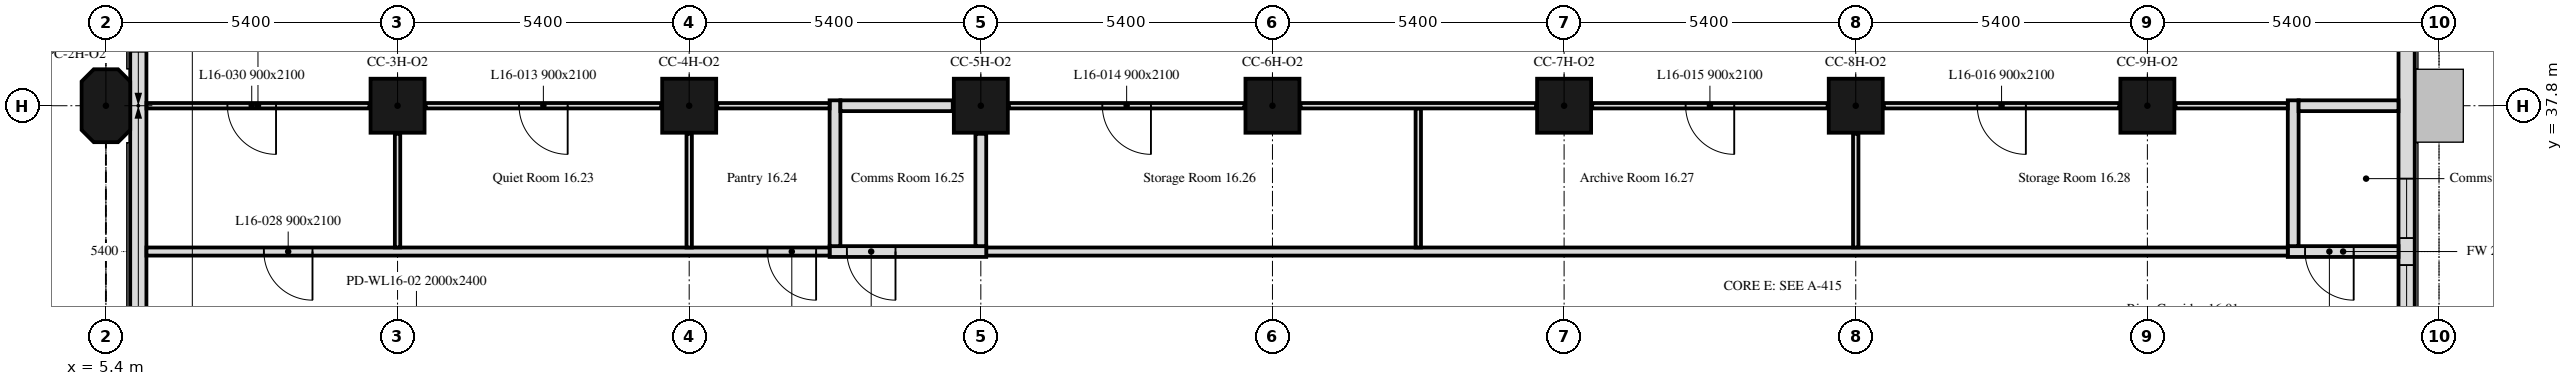
"""IFC4 building model, lengths in metres.
Left out: names, types, materials, properties, quantities, classifications, styles, units other than length and angle.
Written with IfcOpenShell. Run it as: python <this file> out.ifc"""

import sys

from ifc_helpers import new_model, si_unit, direction, frame, frame_2d, origin, origin_2d, place, context, subcontext, project, spatial, polyline, rectangle, outline, extrude, element, fill, save


model = new_model("IFC4")
c1 = context("Model", 3, precision=1e-05, world=origin(), true_north=direction((0.0, 1.0)))
c2 = subcontext(c1, "Body", "Model", "MODEL_VIEW")
j1 = project(units=[si_unit("LENGTHUNIT", "METRE"), si_unit("PLANEANGLEUNIT", "RADIAN")], contexts=[c1])
p1 = place(None, origin())
s1 = spatial("IfcSite", under=j1, at=p1, CompositionType="ELEMENT")
p2 = place(p1, origin())
s2 = spatial("IfcBuilding", under=s1, at=p2, CompositionType="ELEMENT")
p3 = place(p2, frame((0.0, 0.0, 72.6)))
s3 = spatial("IfcBuildingStorey", under=s2, at=p3, CompositionType="ELEMENT", Elevation=72.6)
p4 = place(p3, frame((5.4, 37.8, 0.0), z_axis=(0.0, 0.0, 1.0), x_axis=(0.0, 1.0, 0.0)))
e1 = element("IfcColumn", 1, at=p4, inside=s3, PredefinedType="COLUMN", context=c2, shape_type="SweptSolid", body=[
    extrude(outline(polyline([(-0.45, -0.45), (0.45, -0.45), (0.675, -0.225), (0.675, 0.225), (0.45, 0.45), (-0.45, 0.45), (-0.675, 0.225), (-0.675, -0.225), (-0.45, -0.45)])), origin(), (0.0, 0.0, 1.0), 3.5),
])
for number, where, z_axis, x_axis in (
    (2, (10.8, 37.8, 0.0), (0.0, 0.0, 1.0), (1.0, 0.0, 0.0)),
    (3, (16.2, 37.8, 0.0), (0.0, 0.0, 1.0), (1.0, 0.0, 0.0)),
    (4, (21.6, 37.8, 0.0), (0.0, 0.0, 1.0), (1.0, 0.0, 0.0)),
    (5, (27.0, 37.8, 0.0), (0.0, 0.0, 1.0), (1.0, 0.0, 0.0)),
    (6, (32.4, 37.8, 0.0), (0.0, 0.0, 1.0), (1.0, 0.0, 0.0)),
    (7, (37.8, 37.8, 0.0), (0.0, 0.0, 1.0), (1.0, 0.0, 0.0)),
    (8, (43.2, 37.8, 0.0), (0.0, 0.0, 1.0), (1.0, 0.0, 0.0)),
):
    element("IfcColumn", number, at=place(p3, frame(where, z_axis=z_axis, x_axis=x_axis)), inside=s3, PredefinedType="COLUMN", context=c2, shape_type="SweptSolid", body=[
        extrude(rectangle(XDim=1.0, YDim=1.0, at=origin_2d()), origin(), (0.0, 0.0, 1.0), 3.5),
    ])
p5 = place(p3, frame((48.0, 10.986, 0.0), z_axis=(0.0, 0.0, 1.0), x_axis=(0.0, 1.0, 0.0)))
e9 = element("IfcWall", 9, at=p5, inside=s3, PredefinedType="SOLIDWALL", context=c2, shape_type="SweptSolid", body=[
    extrude(rectangle(XDim=32.027, YDim=0.3, at=frame_2d((16.014, 0.0))), origin(), (0.0, 0.0, 1.0), 3.5),
])
p6 = place(p5, frame((1.164, 0.0, 0.9)))
e10 = element("IfcOpeningElement", 10, at=p6, cuts=e9, PredefinedType="OPENING", context=c2, shape_type="SweptSolid", body=[
    extrude(rectangle(XDim=1.1, YDim=1.7, at=frame_2d((0.55, 0.85))), frame((0.0, 0.16, 0.0), z_axis=(0.0, -1.0, 0.0), x_axis=(1.0, 0.0, 0.0)), (0.0, 0.0, 1.0), 0.32),
])
p7 = place(p5, frame((2.764, 0.0, 0.9)))
e11 = element("IfcOpeningElement", 11, at=p7, cuts=e9, PredefinedType="OPENING", context=c2, shape_type="SweptSolid", body=[
    extrude(rectangle(XDim=1.1, YDim=1.7, at=frame_2d((0.55, 0.85))), frame((0.0, 0.16, 0.0), z_axis=(0.0, -1.0, 0.0), x_axis=(1.0, 0.0, 0.0)), (0.0, 0.0, 1.0), 0.32),
])
p8 = place(p5, frame((11.614, 0.0, 0.9)))
e12 = element("IfcOpeningElement", 12, at=p8, cuts=e9, PredefinedType="OPENING", context=c2, shape_type="SweptSolid", body=[
    extrude(rectangle(XDim=3.4, YDim=1.7, at=frame_2d((1.7, 0.85))), frame((0.0, 0.16, 0.0), z_axis=(0.0, -1.0, 0.0), x_axis=(1.0, 0.0, 0.0)), (0.0, 0.0, 1.0), 0.32),
])
p9 = place(p5, frame((22.764, 0.0, 0.9)))
e13 = element("IfcOpeningElement", 13, at=p9, cuts=e9, PredefinedType="OPENING", context=c2, shape_type="SweptSolid", body=[
    extrude(rectangle(XDim=1.1, YDim=1.7, at=frame_2d((0.55, 0.85))), frame((0.0, 0.16, 0.0), z_axis=(0.0, -1.0, 0.0), x_axis=(1.0, 0.0, 0.0)), (0.0, 0.0, 1.0), 0.32),
])
p10 = place(p5, frame((24.364, 0.0, 0.9)))
e14 = element("IfcOpeningElement", 14, at=p10, cuts=e9, PredefinedType="OPENING", context=c2, shape_type="SweptSolid", body=[
    extrude(rectangle(XDim=1.1, YDim=1.7, at=frame_2d((0.55, 0.85))), frame((0.0, 0.16, 0.0), z_axis=(0.0, -1.0, 0.0), x_axis=(1.0, 0.0, 0.0)), (0.0, 0.0, 1.0), 0.32),
])
p11 = place(p3, frame((6.0, 43.014, 0.0), z_axis=(0.0, 0.0, 1.0), x_axis=(0.0, -1.0, 0.0)))
e15 = element("IfcWall", 15, at=p11, inside=s3, PredefinedType="SOLIDWALL", context=c2, shape_type="SweptSolid", body=[
    extrude(rectangle(XDim=10.614, YDim=0.3, at=frame_2d((5.307, 0.0))), origin(), (0.0, 0.0, 1.0), 3.5),
])
p12 = place(p11, frame((0.814, 0.0, 0.9)))
e16 = element("IfcOpeningElement", 16, at=p12, cuts=e15, PredefinedType="OPENING", context=c2, shape_type="SweptSolid", body=[
    extrude(rectangle(XDim=3.4, YDim=1.7, at=frame_2d((1.7, 0.85))), frame((0.0, 0.16, 0.0), z_axis=(0.0, -1.0, 0.0), x_axis=(1.0, 0.0, 0.0)), (0.0, 0.0, 1.0), 0.32),
])
p13 = place(p3, frame((47.849, 35.1, 0.0), z_axis=(0.0, 0.0, 1.0), x_axis=(-1.0, 0.0, 0.0)))
e17 = element("IfcWall", 17, at=p13, inside=s3, PredefinedType="PARTITIONING", context=c2, shape_type="SweptSolid", body=[
    extrude(rectangle(XDim=2.049, YDim=0.2, at=frame_2d((1.024, 0.0))), origin(), (0.0, 0.0, 1.0), 3.5),
])
p14 = place(p13, frame((0.829, 0.0, 0.0)))
e18 = element("IfcOpeningElement", 18, at=p14, cuts=e17, PredefinedType="OPENING", context=c2, shape_type="SweptSolid", body=[
    extrude(rectangle(XDim=0.9, YDim=2.1, at=frame_2d((0.45, 1.05))), frame((0.0, 0.1, 0.0), z_axis=(0.0, -1.0, 0.0), x_axis=(1.0, 0.0, 0.0)), (0.0, 0.0, 1.0), 0.2),
])
p15 = place(p3, frame((45.8, 35.1, 0.0), z_axis=(0.0, 0.0, 1.0), x_axis=(-1.0, 0.0, 0.0)))
e19 = element("IfcWall", 19, at=p15, inside=s3, PredefinedType="PARTITIONING", context=c2, shape_type="SweptSolid", body=[
    extrude(rectangle(XDim=24.1, YDim=0.15, at=frame_2d((12.05, 0.0))), origin(), (0.0, 0.0, 1.0), 2.75),
])
p16 = place(p3, frame((21.7, 35.1, 0.0), z_axis=(0.0, 0.0, 1.0), x_axis=(-1.0, 0.0, 0.0)))
e20 = element("IfcWall", 20, at=p16, inside=s3, PredefinedType="PARTITIONING", context=c2, shape_type="SweptSolid", body=[
    extrude(rectangle(XDim=2.9, YDim=0.2, at=frame_2d((1.45, 0.0))), origin(), (0.0, 0.0, 1.0), 2.75),
])
p17 = place(p16, frame((1.68, 0.0, 0.0)))
e21 = element("IfcOpeningElement", 21, at=p17, cuts=e20, PredefinedType="OPENING", context=c2, shape_type="SweptSolid", body=[
    extrude(rectangle(XDim=0.9, YDim=2.1, at=frame_2d((0.45, 1.05))), frame((0.0, 0.1, 0.0), z_axis=(0.0, -1.0, 0.0), x_axis=(1.0, 0.0, 0.0)), (0.0, 0.0, 1.0), 0.2),
])
p18 = place(p3, frame((18.8, 35.1, 0.0), z_axis=(0.0, 0.0, 1.0), x_axis=(-1.0, 0.0, 0.0)))
e22 = element("IfcWall", 22, at=p18, inside=s3, PredefinedType="PARTITIONING", context=c2, shape_type="SweptSolid", body=[
    extrude(rectangle(XDim=12.649, YDim=0.15, at=frame_2d((6.325, 0.0))), origin(), (0.0, 0.0, 1.0), 2.75),
])
p19 = place(p18, frame((0.25, 0.0, 0.0)))
e23 = element("IfcOpeningElement", 23, at=p19, cuts=e22, PredefinedType="OPENING", context=c2, shape_type="SweptSolid", body=[
    extrude(rectangle(XDim=0.9, YDim=2.1, at=frame_2d((0.45, 1.05))), frame((0.0, 0.075, 0.0), z_axis=(0.0, -1.0, 0.0), x_axis=(1.0, 0.0, 0.0)), (0.0, 0.0, 1.0), 0.15),
])
p20 = place(p18, frame((9.575, 0.0, 0.0)))
e24 = element("IfcOpeningElement", 24, at=p20, cuts=e22, PredefinedType="OPENING", context=c2, shape_type="SweptSolid", body=[
    extrude(rectangle(XDim=0.9, YDim=2.1, at=frame_2d((0.45, 1.05))), frame((0.0, 0.075, 0.0), z_axis=(0.0, -1.0, 0.0), x_axis=(1.0, 0.0, 0.0)), (0.0, 0.0, 1.0), 0.15),
])
p21 = place(p3, frame((10.28, 37.8, 0.0), z_axis=(0.0, 0.0, 1.0), x_axis=(-1.0, 0.0, 0.0)))
e25 = element("IfcWall", 25, at=p21, inside=s3, PredefinedType="PARTITIONING", context=c2, shape_type="SweptSolid", body=[
    extrude(rectangle(XDim=4.129, YDim=0.1, at=frame_2d((2.064, 0.0))), origin(), (0.0, 0.0, 1.0), 3.5),
])
p22 = place(p21, frame((1.73, 0.0, 0.0)))
e26 = element("IfcOpeningElement", 26, at=p22, cuts=e25, PredefinedType="OPENING", context=c2, shape_type="SweptSolid", body=[
    extrude(rectangle(XDim=0.9, YDim=2.1, at=frame_2d((0.45, 1.05))), frame((0.0, 0.05, 0.0), z_axis=(0.0, -1.0, 0.0), x_axis=(1.0, 0.0, 0.0)), (0.0, 0.0, 1.0), 0.1),
])
p23 = place(p3, frame((10.8, 35.175, 0.0), z_axis=(0.0, 0.0, 1.0), x_axis=(0.0, 1.0, 0.0)))
e27 = element("IfcWall", 27, at=p23, inside=s3, PredefinedType="PARTITIONING", context=c2, shape_type="SweptSolid", body=[
    extrude(rectangle(XDim=2.105, YDim=0.1, at=frame_2d((1.052, 0.0))), origin(), (0.0, 0.0, 1.0), 3.5),
])
p24 = place(p3, frame((16.2, 35.175, 0.0), z_axis=(0.0, 0.0, 1.0), x_axis=(0.0, 1.0, 0.0)))
e28 = element("IfcWall", 28, at=p24, inside=s3, PredefinedType="PARTITIONING", context=c2, shape_type="SweptSolid", body=[
    extrude(rectangle(XDim=2.105, YDim=0.1, at=frame_2d((1.052, 0.0))), origin(), (0.0, 0.0, 1.0), 2.75),
])
p25 = place(p3, frame((15.68, 37.8, 0.0), z_axis=(0.0, 0.0, 1.0), x_axis=(-1.0, 0.0, 0.0)))
e29 = element("IfcWall", 29, at=p25, inside=s3, PredefinedType="PARTITIONING", context=c2, shape_type="SweptSolid", body=[
    extrude(rectangle(XDim=4.36, YDim=0.1, at=frame_2d((2.18, 0.0))), origin(), (0.0, 0.0, 1.0), 3.5),
])
p26 = place(p25, frame((1.73, 0.0, 0.0)))
e30 = element("IfcOpeningElement", 30, at=p26, cuts=e29, PredefinedType="OPENING", context=c2, shape_type="SweptSolid", body=[
    extrude(rectangle(XDim=0.9, YDim=2.1, at=frame_2d((0.45, 1.05))), frame((0.0, 0.05, 0.0), z_axis=(0.0, -1.0, 0.0), x_axis=(1.0, 0.0, 0.0)), (0.0, 0.0, 1.0), 0.1),
])
p27 = place(p3, frame((18.9, 35.2, 0.0), z_axis=(0.0, 0.0, 1.0), x_axis=(0.0, 1.0, 0.0)))
e31 = element("IfcWall", 31, at=p27, inside=s3, PredefinedType="PARTITIONING", context=c2, shape_type="SweptSolid", body=[
    extrude(rectangle(XDim=2.7, YDim=0.2, at=frame_2d((1.35, 0.0))), origin(), (0.0, 0.0, 1.0), 3.5),
])
p28 = place(p3, frame((18.8, 37.8, 0.0), z_axis=(0.0, 0.0, 1.0), x_axis=(-1.0, 0.0, 0.0)))
e32 = element("IfcWall", 32, at=p28, inside=s3, PredefinedType="PARTITIONING", context=c2, shape_type="SweptSolid", body=[
    extrude(rectangle(XDim=2.08, YDim=0.1, at=frame_2d((1.04, 0.0))), origin(), (0.0, 0.0, 1.0), 3.5),
])
p29 = place(p3, frame((21.6, 35.2, 0.0), z_axis=(0.0, 0.0, 1.0), x_axis=(0.0, 1.0, 0.0)))
e33 = element("IfcWall", 33, at=p29, inside=s3, PredefinedType="PARTITIONING", context=c2, shape_type="SweptSolid", body=[
    extrude(rectangle(XDim=2.08, YDim=0.2, at=frame_2d((1.04, 0.0))), origin(), (0.0, 0.0, 1.0), 2.75),
])
p30 = place(p3, frame((21.08, 37.8, 0.0), z_axis=(0.0, 0.0, 1.0), x_axis=(-1.0, 0.0, 0.0)))
e34 = element("IfcWall", 34, at=p30, inside=s3, PredefinedType="PARTITIONING", context=c2, shape_type="SweptSolid", body=[
    extrude(rectangle(XDim=2.08, YDim=0.2, at=frame_2d((1.04, 0.0))), origin(), (0.0, 0.0, 1.0), 3.5),
])
p31 = place(p3, frame((29.7, 35.175, 0.0), z_axis=(0.0, 0.0, 1.0), x_axis=(0.0, 1.0, 0.0)))
e35 = element("IfcWall", 35, at=p31, inside=s3, PredefinedType="PARTITIONING", context=c2, shape_type="SweptSolid", body=[
    extrude(rectangle(XDim=2.575, YDim=0.1, at=frame_2d((1.288, 0.0))), origin(), (0.0, 0.0, 1.0), 3.5),
])
p32 = place(p3, frame((26.48, 37.8, 0.0), z_axis=(0.0, 0.0, 1.0), x_axis=(-1.0, 0.0, 0.0)))
e36 = element("IfcWall", 36, at=p32, inside=s3, PredefinedType="PARTITIONING", context=c2, shape_type="SweptSolid", body=[
    extrude(rectangle(XDim=4.36, YDim=0.1, at=frame_2d((2.18, 0.0))), origin(), (0.0, 0.0, 1.0), 3.5),
])
p33 = place(p32, frame((1.73, 0.0, 0.0)))
e37 = element("IfcOpeningElement", 37, at=p33, cuts=e36, PredefinedType="OPENING", context=c2, shape_type="SweptSolid", body=[
    extrude(rectangle(XDim=0.9, YDim=2.1, at=frame_2d((0.45, 1.05))), frame((0.0, 0.05, 0.0), z_axis=(0.0, -1.0, 0.0), x_axis=(1.0, 0.0, 0.0)), (0.0, 0.0, 1.0), 0.1),
])
p34 = place(p3, frame((37.8, 35.175, 0.0), z_axis=(0.0, 0.0, 1.0), x_axis=(0.0, 1.0, 0.0)))
e38 = element("IfcWall", 38, at=p34, inside=s3, PredefinedType="PARTITIONING", context=c2, shape_type="SweptSolid", body=[
    extrude(rectangle(XDim=2.105, YDim=0.1, at=frame_2d((1.052, 0.0))), origin(), (0.0, 0.0, 1.0), 2.75),
])
p35 = place(p3, frame((37.28, 37.8, 0.0), z_axis=(0.0, 0.0, 1.0), x_axis=(-1.0, 0.0, 0.0)))
e39 = element("IfcWall", 39, at=p35, inside=s3, PredefinedType="PARTITIONING", context=c2, shape_type="SweptSolid", body=[
    extrude(rectangle(XDim=4.36, YDim=0.1, at=frame_2d((2.18, 0.0))), origin(), (0.0, 0.0, 1.0), 2.75),
])
p36 = place(p35, frame((1.73, 0.0, 0.0)))
e40 = element("IfcOpeningElement", 40, at=p36, cuts=e39, PredefinedType="OPENING", context=c2, shape_type="SweptSolid", body=[
    extrude(rectangle(XDim=0.9, YDim=2.1, at=frame_2d((0.45, 1.05))), frame((0.0, 0.05, 0.0), z_axis=(0.0, -1.0, 0.0), x_axis=(1.0, 0.0, 0.0)), (0.0, 0.0, 1.0), 0.1),
])
p37 = place(p3, frame((31.88, 37.8, 0.0), z_axis=(0.0, 0.0, 1.0), x_axis=(-1.0, 0.0, 0.0)))
e41 = element("IfcWall", 41, at=p37, inside=s3, PredefinedType="PARTITIONING", context=c2, shape_type="SweptSolid", body=[
    extrude(rectangle(XDim=4.36, YDim=0.1, at=frame_2d((2.18, 0.0))), origin(), (0.0, 0.0, 1.0), 3.5),
])
p38 = place(p3, frame((45.9, 35.2, 0.0), z_axis=(0.0, 0.0, 1.0), x_axis=(0.0, 1.0, 0.0)))
e42 = element("IfcWall", 42, at=p38, inside=s3, PredefinedType="PARTITIONING", context=c2, shape_type="SweptSolid", body=[
    extrude(rectangle(XDim=2.7, YDim=0.2, at=frame_2d((1.35, 0.0))), origin(), (0.0, 0.0, 1.0), 2.75),
])
p39 = place(p3, frame((45.8, 37.8, 0.0), z_axis=(0.0, 0.0, 1.0), x_axis=(-1.0, 0.0, 0.0)))
e43 = element("IfcWall", 43, at=p39, inside=s3, PredefinedType="PARTITIONING", context=c2, shape_type="SweptSolid", body=[
    extrude(rectangle(XDim=2.08, YDim=0.1, at=frame_2d((1.04, 0.0))), origin(), (0.0, 0.0, 1.0), 2.75),
])
p40 = place(p3, frame((42.68, 37.8, 0.0), z_axis=(0.0, 0.0, 1.0), x_axis=(-1.0, 0.0, 0.0)))
e44 = element("IfcWall", 44, at=p40, inside=s3, PredefinedType="PARTITIONING", context=c2, shape_type="SweptSolid", body=[
    extrude(rectangle(XDim=4.36, YDim=0.1, at=frame_2d((2.18, 0.0))), origin(), (0.0, 0.0, 1.0), 2.75),
])
p41 = place(p40, frame((1.73, 0.0, 0.0)))
e45 = element("IfcOpeningElement", 45, at=p41, cuts=e44, PredefinedType="OPENING", context=c2, shape_type="SweptSolid", body=[
    extrude(rectangle(XDim=0.9, YDim=2.1, at=frame_2d((0.45, 1.05))), frame((0.0, 0.05, 0.0), z_axis=(0.0, -1.0, 0.0), x_axis=(1.0, 0.0, 0.0)), (0.0, 0.0, 1.0), 0.1),
])
p42 = place(p3, frame((47.849, 37.8, 0.0), z_axis=(0.0, 0.0, 1.0), x_axis=(-1.0, 0.0, 0.0)))
e46 = element("IfcWall", 46, at=p42, inside=s3, PredefinedType="PARTITIONING", context=c2, shape_type="SweptSolid", body=[
    extrude(rectangle(XDim=1.849, YDim=0.2, at=frame_2d((0.925, 0.0))), origin(), (0.0, 0.0, 1.0), 2.75),
])
p43 = place(p9, origin())
e47 = element("IfcWindow", 47, at=p43, inside=s3, PartitioningType="SINGLE_PANEL", PredefinedType="WINDOW", context=c2, shape_type="SweptSolid", body=[
    extrude(rectangle(XDim=1.1, YDim=1.7, at=frame_2d((0.55, 0.85))), frame((0.0, 0.03, 0.0), z_axis=(0.0, -1.0, 0.0), x_axis=(1.0, 0.0, 0.0)), (0.0, 0.0, 1.0), 0.06),
])
fill(e13, e47)
p44 = place(p10, origin())
e48 = element("IfcWindow", 48, at=p44, inside=s3, PartitioningType="SINGLE_PANEL", PredefinedType="WINDOW", context=c2, shape_type="SweptSolid", body=[
    extrude(rectangle(XDim=1.1, YDim=1.7, at=frame_2d((0.55, 0.85))), frame((0.0, 0.03, 0.0), z_axis=(0.0, -1.0, 0.0), x_axis=(1.0, 0.0, 0.0)), (0.0, 0.0, 1.0), 0.06),
])
fill(e14, e48)
p45 = place(p19, origin())
e49 = element("IfcDoor", 49, at=p45, inside=s3, OperationType="SINGLE_SWING_RIGHT", PredefinedType="DOOR", context=c2, shape_type="SweptSolid", body=[
    extrude(rectangle(XDim=0.9, YDim=2.1, at=frame_2d((0.45, 1.05))), frame((0.0, 0.025, 0.0), z_axis=(0.0, -1.0, 0.0), x_axis=(1.0, 0.0, 0.0)), (0.0, 0.0, 1.0), 0.05),
])
fill(e23, e49)
p46 = place(p17, origin())
e50 = element("IfcDoor", 50, at=p46, inside=s3, OperationType="SINGLE_SWING_RIGHT", PredefinedType="DOOR", context=c2, shape_type="SweptSolid", body=[
    extrude(rectangle(XDim=0.9, YDim=2.1, at=frame_2d((0.45, 1.05))), frame((0.0, 0.025, 0.0), z_axis=(0.0, -1.0, 0.0), x_axis=(1.0, 0.0, 0.0)), (0.0, 0.0, 1.0), 0.05),
])
fill(e21, e50)
p47 = place(p14, origin())
e51 = element("IfcDoor", 51, at=p47, inside=s3, OperationType="SINGLE_SWING_LEFT", PredefinedType="DOOR", context=c2, shape_type="SweptSolid", body=[
    extrude(rectangle(XDim=0.9, YDim=2.1, at=frame_2d((0.45, 1.05))), frame((0.0, 0.025, 0.0), z_axis=(0.0, -1.0, 0.0), x_axis=(1.0, 0.0, 0.0)), (0.0, 0.0, 1.0), 0.05),
])
fill(e18, e51)
p48 = place(p26, origin())
e52 = element("IfcDoor", 52, at=p48, inside=s3, OperationType="SINGLE_SWING_RIGHT", PredefinedType="DOOR", context=c2, shape_type="SweptSolid", body=[
    extrude(rectangle(XDim=0.9, YDim=2.1, at=frame_2d((0.45, 1.05))), frame((0.0, 0.025, 0.0), z_axis=(0.0, -1.0, 0.0), x_axis=(1.0, 0.0, 0.0)), (0.0, 0.0, 1.0), 0.05),
])
fill(e30, e52)
p49 = place(p33, origin())
e53 = element("IfcDoor", 53, at=p49, inside=s3, OperationType="SINGLE_SWING_RIGHT", PredefinedType="DOOR", context=c2, shape_type="SweptSolid", body=[
    extrude(rectangle(XDim=0.9, YDim=2.1, at=frame_2d((0.45, 1.05))), frame((0.0, 0.025, 0.0), z_axis=(0.0, -1.0, 0.0), x_axis=(1.0, 0.0, 0.0)), (0.0, 0.0, 1.0), 0.05),
])
fill(e37, e53)
p50 = place(p36, origin())
e54 = element("IfcDoor", 54, at=p50, inside=s3, OperationType="SINGLE_SWING_LEFT", PredefinedType="DOOR", context=c2, shape_type="SweptSolid", body=[
    extrude(rectangle(XDim=0.9, YDim=2.1, at=frame_2d((0.45, 1.05))), frame((0.0, 0.025, 0.0), z_axis=(0.0, -1.0, 0.0), x_axis=(1.0, 0.0, 0.0)), (0.0, 0.0, 1.0), 0.05),
])
fill(e40, e54)
p51 = place(p41, origin())
e55 = element("IfcDoor", 55, at=p51, inside=s3, OperationType="SINGLE_SWING_LEFT", PredefinedType="DOOR", context=c2, shape_type="SweptSolid", body=[
    extrude(rectangle(XDim=0.9, YDim=2.1, at=frame_2d((0.45, 1.05))), frame((0.0, 0.025, 0.0), z_axis=(0.0, -1.0, 0.0), x_axis=(1.0, 0.0, 0.0)), (0.0, 0.0, 1.0), 0.05),
])
fill(e45, e55)
p52 = place(p20, origin())
e56 = element("IfcDoor", 56, at=p52, inside=s3, OperationType="SINGLE_SWING_RIGHT", PredefinedType="DOOR", context=c2, shape_type="SweptSolid", body=[
    extrude(rectangle(XDim=0.9, YDim=2.1, at=frame_2d((0.45, 1.05))), frame((0.0, 0.025, 0.0), z_axis=(0.0, -1.0, 0.0), x_axis=(1.0, 0.0, 0.0)), (0.0, 0.0, 1.0), 0.05),
])
fill(e24, e56)
p53 = place(p22, origin())
e57 = element("IfcDoor", 57, at=p53, inside=s3, OperationType="SINGLE_SWING_LEFT", PredefinedType="DOOR", context=c2, shape_type="SweptSolid", body=[
    extrude(rectangle(XDim=0.9, YDim=2.1, at=frame_2d((0.45, 1.05))), frame((0.0, 0.025, 0.0), z_axis=(0.0, -1.0, 0.0), x_axis=(1.0, 0.0, 0.0)), (0.0, 0.0, 1.0), 0.05),
])
fill(e26, e57)
save(model, sys.argv[1])
